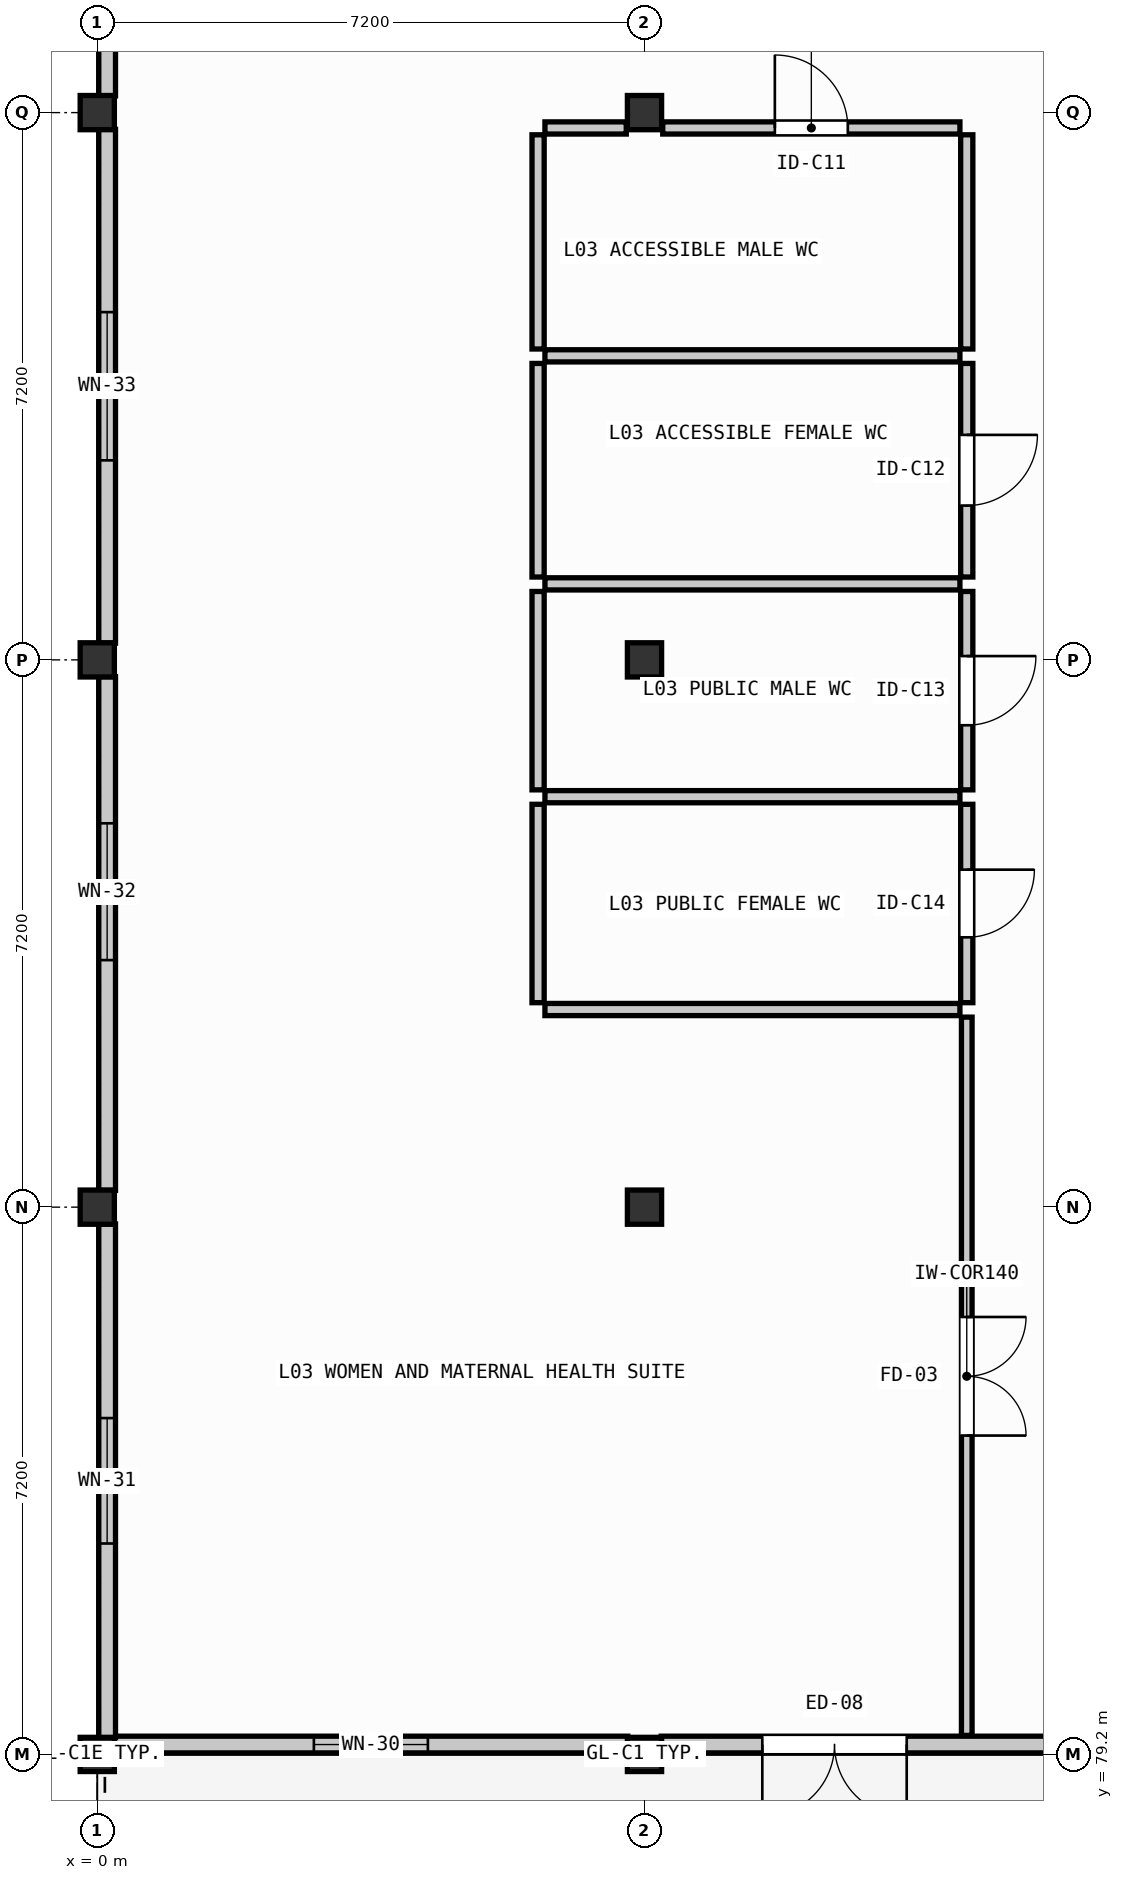
"""IFC4 building model, lengths in metres.
Left out: names, types, materials, properties, quantities, classifications, styles, units other than length and angle.
Written with IfcOpenShell. Run it as: python <this file> out.ifc"""

import sys

from ifc_helpers import new_model, si_unit, direction, frame, frame_2d, origin, origin_2d, place, context, subcontext, project, spatial, rectangle, extrude, element, fill, save


model = new_model("IFC4")
c1 = context("Model", 3, precision=1e-05, world=origin(), true_north=direction((0.0, 1.0)))
c2 = subcontext(c1, "Body", "Model", "MODEL_VIEW")
j1 = project(units=[si_unit("LENGTHUNIT", "METRE"), si_unit("PLANEANGLEUNIT", "RADIAN")], contexts=[c1])
p1 = place(None, origin())
s1 = spatial("IfcSite", under=j1, at=p1, CompositionType="ELEMENT")
p2 = place(p1, origin())
s2 = spatial("IfcBuilding", under=s1, at=p2, CompositionType="ELEMENT")
p3 = place(p2, frame((0.0, 0.0, 9.3)))
s3 = spatial("IfcBuildingStorey", under=s2, at=p3, CompositionType="ELEMENT", Elevation=9.3)
for number, where, z_axis, x_axis in (
    (1, (0.0, 79.2, 0.0), (0.0, 0.0, 1.0), (1.0, 0.0, 0.0)),
    (2, (0.0, 86.4, 0.0), (0.0, 0.0, 1.0), (1.0, 0.0, 0.0)),
    (3, (0.0, 93.6, 0.0), (0.0, 0.0, 1.0), (1.0, 0.0, 0.0)),
    (4, (0.0, 100.8, 0.0), (0.0, 0.0, 1.0), (1.0, 0.0, 0.0)),
    (5, (7.2, 79.2, 0.0), (0.0, 0.0, 1.0), (1.0, 0.0, 0.0)),
    (6, (7.2, 86.4, 0.0), (0.0, 0.0, 1.0), (1.0, 0.0, 0.0)),
    (7, (7.2, 93.6, 0.0), (0.0, 0.0, 1.0), (1.0, 0.0, 0.0)),
    (8, (7.2, 100.8, 0.0), (0.0, 0.0, 1.0), (1.0, 0.0, 0.0)),
):
    element("IfcColumn", number, at=place(p3, frame(where, z_axis=z_axis, x_axis=x_axis)), inside=s3, PredefinedType="COLUMN", context=c2, shape_type="SweptSolid", body=[
        extrude(rectangle(XDim=0.45, YDim=0.45, at=origin_2d()), origin(), (0.0, 0.0, 1.0), 3.99),
    ])
p4 = place(p3, frame((14.18, 79.33, 0.0), z_axis=(0.0, 0.0, 1.0), x_axis=(-1.0, 0.0, 0.0)))
e9 = element("IfcWall", 9, at=p4, inside=s3, PredefinedType="SOLIDWALL", context=c2, shape_type="SweptSolid", body=[
    extrude(rectangle(XDim=6.76, YDim=0.22, at=frame_2d((3.38, 0.0))), origin(), (0.0, 0.0, 1.0), 3.27),
])
p5 = place(p4, frame((3.53, 0.0, 0.0)))
e10 = element("IfcOpeningElement", 10, at=p5, cuts=e9, PredefinedType="OPENING", context=c2, shape_type="SweptSolid", body=[
    extrude(rectangle(XDim=1.9, YDim=2.3, at=frame_2d((0.95, 1.15))), frame((0.0, 0.12, 0.0), z_axis=(0.0, -1.0, 0.0), x_axis=(1.0, 0.0, 0.0)), (0.0, 0.0, 1.0), 0.24),
])
p6 = place(p3, frame((6.98, 79.33, 0.0), z_axis=(0.0, 0.0, 1.0), x_axis=(-1.0, 0.0, 0.0)))
e11 = element("IfcWall", 11, at=p6, inside=s3, PredefinedType="SOLIDWALL", context=c2, shape_type="SweptSolid", body=[
    extrude(rectangle(XDim=6.76, YDim=0.22, at=frame_2d((3.38, 0.0))), origin(), (0.0, 0.0, 1.0), 3.27),
])
p7 = place(p6, frame((2.63, 0.0, 0.95)))
e12 = element("IfcOpeningElement", 12, at=p7, cuts=e11, PredefinedType="OPENING", context=c2, shape_type="SweptSolid", body=[
    extrude(rectangle(XDim=1.5, YDim=1.25, at=frame_2d((0.75, 0.625))), frame((0.0, 0.12, 0.0), z_axis=(0.0, -1.0, 0.0), x_axis=(1.0, 0.0, 0.0)), (0.0, 0.0, 1.0), 0.24),
])
p8 = place(p3, frame((0.13, 79.42, 0.0), z_axis=(0.0, 0.0, 1.0), x_axis=(0.0, 1.0, 0.0)))
e13 = element("IfcWall", 13, at=p8, inside=s3, PredefinedType="SOLIDWALL", context=c2, shape_type="SweptSolid", body=[
    extrude(rectangle(XDim=6.76, YDim=0.22, at=frame_2d((3.38, 0.0))), origin(), (0.0, 0.0, 1.0), 3.27),
])
p9 = place(p8, frame((2.555, 0.0, 0.95)))
e14 = element("IfcOpeningElement", 14, at=p9, cuts=e13, PredefinedType="OPENING", context=c2, shape_type="SweptSolid", body=[
    extrude(rectangle(XDim=1.65, YDim=1.25, at=frame_2d((0.825, 0.625))), frame((0.0, 0.12, 0.0), z_axis=(0.0, -1.0, 0.0), x_axis=(1.0, 0.0, 0.0)), (0.0, 0.0, 1.0), 0.24),
])
p10 = place(p3, frame((0.13, 86.62, 0.0), z_axis=(0.0, 0.0, 1.0), x_axis=(0.0, 1.0, 0.0)))
e15 = element("IfcWall", 15, at=p10, inside=s3, PredefinedType="SOLIDWALL", context=c2, shape_type="SweptSolid", body=[
    extrude(rectangle(XDim=6.76, YDim=0.22, at=frame_2d((3.38, 0.0))), origin(), (0.0, 0.0, 1.0), 3.27),
])
p11 = place(p10, frame((3.03, 0.0, 0.95)))
e16 = element("IfcOpeningElement", 16, at=p11, cuts=e15, PredefinedType="OPENING", context=c2, shape_type="SweptSolid", body=[
    extrude(rectangle(XDim=1.8, YDim=1.25, at=frame_2d((0.9, 0.625))), frame((0.0, 0.12, 0.0), z_axis=(0.0, -1.0, 0.0), x_axis=(1.0, 0.0, 0.0)), (0.0, 0.0, 1.0), 0.24),
])
p12 = place(p3, frame((0.13, 93.82, 0.0), z_axis=(0.0, 0.0, 1.0), x_axis=(0.0, 1.0, 0.0)))
e17 = element("IfcWall", 17, at=p12, inside=s3, PredefinedType="SOLIDWALL", context=c2, shape_type="SweptSolid", body=[
    extrude(rectangle(XDim=6.76, YDim=0.22, at=frame_2d((3.38, 0.0))), origin(), (0.0, 0.0, 1.0), 3.27),
])
p13 = place(p12, frame((2.405, 0.0, 0.95)))
e18 = element("IfcOpeningElement", 18, at=p13, cuts=e17, PredefinedType="OPENING", context=c2, shape_type="SweptSolid", body=[
    extrude(rectangle(XDim=1.95, YDim=1.25, at=frame_2d((0.975, 0.625))), frame((0.0, 0.12, 0.0), z_axis=(0.0, -1.0, 0.0), x_axis=(1.0, 0.0, 0.0)), (0.0, 0.0, 1.0), 0.24),
])
p14 = place(p3, frame((0.13, 101.02, 0.0), z_axis=(0.0, 0.0, 1.0), x_axis=(0.0, 1.0, 0.0)))
e19 = element("IfcWall", 19, at=p14, inside=s3, PredefinedType="SOLIDWALL", context=c2, shape_type="SweptSolid", body=[
    extrude(rectangle(XDim=6.76, YDim=0.22, at=frame_2d((3.38, 0.0))), origin(), (0.0, 0.0, 1.0), 3.27),
])
p15 = place(p14, frame((2.33, 0.0, 0.95)))
e20 = element("IfcOpeningElement", 20, at=p15, cuts=e19, PredefinedType="OPENING", context=c2, shape_type="SweptSolid", body=[
    extrude(rectangle(XDim=2.1, YDim=1.25, at=frame_2d((1.05, 0.625))), frame((0.0, 0.12, 0.0), z_axis=(0.0, -1.0, 0.0), x_axis=(1.0, 0.0, 0.0)), (0.0, 0.0, 1.0), 0.24),
])
p16 = place(p3, frame((5.89, 100.598, 0.0), z_axis=(0.0, 0.0, 1.0), x_axis=(1.0, 0.0, 0.0)))
e21 = element("IfcWall", 21, at=p16, inside=s3, PredefinedType="PLUMBINGWALL", context=c2, shape_type="SweptSolid", body=[
    extrude(rectangle(XDim=1.07, YDim=0.16, at=frame_2d((0.535, 0.0))), origin(), (0.0, 0.0, 1.0), 3.27),
])
p17 = place(p3, frame((7.44, 100.598, 0.0), z_axis=(0.0, 0.0, 1.0), x_axis=(1.0, 0.0, 0.0)))
e22 = element("IfcWall", 22, at=p17, inside=s3, PredefinedType="PLUMBINGWALL", context=c2, shape_type="SweptSolid", body=[
    extrude(rectangle(XDim=3.91, YDim=0.16, at=frame_2d((1.955, 0.0))), origin(), (0.0, 0.0, 1.0), 3.27),
])
p18 = place(p17, frame((1.475, 0.0, 0.0)))
e23 = element("IfcOpeningElement", 23, at=p18, cuts=e22, PredefinedType="OPENING", context=c2, shape_type="SweptSolid", body=[
    extrude(rectangle(XDim=0.96, YDim=2.2, at=frame_2d((0.48, 1.1))), frame((0.0, 0.09, 0.0), z_axis=(0.0, -1.0, 0.0), x_axis=(1.0, 0.0, 0.0)), (0.0, 0.0, 1.0), 0.18),
])
p19 = place(p3, frame((11.44, 100.508, 0.0), z_axis=(0.0, 0.0, 1.0), x_axis=(0.0, -1.0, 0.0)))
e24 = element("IfcWall", 24, at=p19, inside=s3, PredefinedType="PLUMBINGWALL", context=c2, shape_type="SweptSolid", body=[
    extrude(rectangle(XDim=2.818, YDim=0.16, at=frame_2d((1.409, 0.0))), origin(), (0.0, 0.0, 1.0), 3.27),
])
p20 = place(p3, frame((11.35, 97.6, 0.0), z_axis=(0.0, 0.0, 1.0), x_axis=(-1.0, 0.0, 0.0)))
e25 = element("IfcWall", 25, at=p20, inside=s3, PredefinedType="PLUMBINGWALL", context=c2, shape_type="SweptSolid", body=[
    extrude(rectangle(XDim=5.46, YDim=0.16, at=frame_2d((2.73, 0.0))), origin(), (0.0, 0.0, 1.0), 3.35),
])
p21 = place(p3, frame((5.8, 97.69, 0.0), z_axis=(0.0, 0.0, 1.0), x_axis=(0.0, 1.0, 0.0)))
e26 = element("IfcWall", 26, at=p21, inside=s3, PredefinedType="PLUMBINGWALL", context=c2, shape_type="SweptSolid", body=[
    extrude(rectangle(XDim=2.818, YDim=0.16, at=frame_2d((1.409, 0.0))), origin(), (0.0, 0.0, 1.0), 3.27),
])
p22 = place(p3, frame((11.44, 97.5, 0.0), z_axis=(0.0, 0.0, 1.0), x_axis=(0.0, -1.0, 0.0)))
e27 = element("IfcWall", 27, at=p22, inside=s3, PredefinedType="PLUMBINGWALL", context=c2, shape_type="SweptSolid", body=[
    extrude(rectangle(XDim=2.81, YDim=0.16, at=frame_2d((1.405, 0.0))), origin(), (0.0, 0.0, 1.0), 3.97),
])
p23 = place(p22, frame((0.94, 0.0, 0.0)))
e28 = element("IfcOpeningElement", 28, at=p23, cuts=e27, PredefinedType="OPENING", context=c2, shape_type="SweptSolid", body=[
    extrude(rectangle(XDim=0.93, YDim=2.1, at=frame_2d((0.465, 1.05))), frame((0.0, 0.09, 0.0), z_axis=(0.0, -1.0, 0.0), x_axis=(1.0, 0.0, 0.0)), (0.0, 0.0, 1.0), 0.18),
])
p24 = place(p3, frame((11.35, 94.6, 0.0), z_axis=(0.0, 0.0, 1.0), x_axis=(-1.0, 0.0, 0.0)))
e29 = element("IfcWall", 29, at=p24, inside=s3, PredefinedType="PLUMBINGWALL", context=c2, shape_type="SweptSolid", body=[
    extrude(rectangle(XDim=5.46, YDim=0.16, at=frame_2d((2.73, 0.0))), origin(), (0.0, 0.0, 1.0), 3.35),
])
p25 = place(p3, frame((5.8, 94.69, 0.0), z_axis=(0.0, 0.0, 1.0), x_axis=(0.0, 1.0, 0.0)))
e30 = element("IfcWall", 30, at=p25, inside=s3, PredefinedType="PLUMBINGWALL", context=c2, shape_type="SweptSolid", body=[
    extrude(rectangle(XDim=2.81, YDim=0.16, at=frame_2d((1.405, 0.0))), origin(), (0.0, 0.0, 1.0), 3.97),
])
p26 = place(p3, frame((11.44, 94.5, 0.0), z_axis=(0.0, 0.0, 1.0), x_axis=(0.0, -1.0, 0.0)))
e31 = element("IfcWall", 31, at=p26, inside=s3, PredefinedType="PLUMBINGWALL", context=c2, shape_type="SweptSolid", body=[
    extrude(rectangle(XDim=2.61, YDim=0.16, at=frame_2d((1.305, 0.0))), origin(), (0.0, 0.0, 1.0), 3.27),
])
p27 = place(p26, frame((0.85, 0.0, 0.0)))
e32 = element("IfcOpeningElement", 32, at=p27, cuts=e31, PredefinedType="OPENING", context=c2, shape_type="SweptSolid", body=[
    extrude(rectangle(XDim=0.91, YDim=2.18, at=frame_2d((0.455, 1.09))), frame((0.0, 0.09, 0.0), z_axis=(0.0, -1.0, 0.0), x_axis=(1.0, 0.0, 0.0)), (0.0, 0.0, 1.0), 0.18),
])
p28 = place(p3, frame((11.35, 91.8, 0.0), z_axis=(0.0, 0.0, 1.0), x_axis=(-1.0, 0.0, 0.0)))
e33 = element("IfcWall", 33, at=p28, inside=s3, PredefinedType="PLUMBINGWALL", context=c2, shape_type="SweptSolid", body=[
    extrude(rectangle(XDim=5.46, YDim=0.16, at=frame_2d((2.73, 0.0))), origin(), (0.0, 0.0, 1.0), 3.35),
])
p29 = place(p3, frame((5.8, 91.89, 0.0), z_axis=(0.0, 0.0, 1.0), x_axis=(0.0, 1.0, 0.0)))
e34 = element("IfcWall", 34, at=p29, inside=s3, PredefinedType="PLUMBINGWALL", context=c2, shape_type="SweptSolid", body=[
    extrude(rectangle(XDim=2.61, YDim=0.16, at=frame_2d((1.305, 0.0))), origin(), (0.0, 0.0, 1.0), 3.27),
])
p30 = place(p3, frame((11.44, 91.7, 0.0), z_axis=(0.0, 0.0, 1.0), x_axis=(0.0, -1.0, 0.0)))
e35 = element("IfcWall", 35, at=p30, inside=s3, PredefinedType="PLUMBINGWALL", context=c2, shape_type="SweptSolid", body=[
    extrude(rectangle(XDim=2.61, YDim=0.16, at=frame_2d((1.305, 0.0))), origin(), (0.0, 0.0, 1.0), 3.97),
])
p31 = place(p30, frame((0.86, 0.0, 0.0)))
e36 = element("IfcOpeningElement", 36, at=p31, cuts=e35, PredefinedType="OPENING", context=c2, shape_type="SweptSolid", body=[
    extrude(rectangle(XDim=0.89, YDim=2.08, at=frame_2d((0.445, 1.04))), frame((0.0, 0.09, 0.0), z_axis=(0.0, -1.0, 0.0), x_axis=(1.0, 0.0, 0.0)), (0.0, 0.0, 1.0), 0.18),
])
p32 = place(p3, frame((11.35, 89.0, 0.0), z_axis=(0.0, 0.0, 1.0), x_axis=(-1.0, 0.0, 0.0)))
e37 = element("IfcWall", 37, at=p32, inside=s3, PredefinedType="PLUMBINGWALL", context=c2, shape_type="SweptSolid", body=[
    extrude(rectangle(XDim=5.46, YDim=0.16, at=frame_2d((2.73, 0.0))), origin(), (0.0, 0.0, 1.0), 3.35),
])
p33 = place(p3, frame((5.8, 89.09, 0.0), z_axis=(0.0, 0.0, 1.0), x_axis=(0.0, 1.0, 0.0)))
e38 = element("IfcWall", 38, at=p33, inside=s3, PredefinedType="PLUMBINGWALL", context=c2, shape_type="SweptSolid", body=[
    extrude(rectangle(XDim=2.61, YDim=0.16, at=frame_2d((1.305, 0.0))), origin(), (0.0, 0.0, 1.0), 3.97),
])
p34 = place(p3, frame((11.44, 88.9, 0.0), z_axis=(0.0, 0.0, 1.0), x_axis=(0.0, -1.0, 0.0)))
e39 = element("IfcWall", 39, at=p34, inside=s3, PredefinedType="PARTITIONING", context=c2, shape_type="SweptSolid", body=[
    extrude(rectangle(XDim=9.45, YDim=0.14, at=frame_2d((4.725, 0.0))), origin(), (0.0, 0.0, 1.0), 3.27),
])
p35 = place(p34, frame((3.945, 0.0, 0.0)))
e40 = element("IfcOpeningElement", 40, at=p35, cuts=e39, PredefinedType="OPENING", context=c2, shape_type="SweptSolid", body=[
    extrude(rectangle(XDim=1.56, YDim=2.22, at=frame_2d((0.78, 1.11))), frame((0.0, 0.08, 0.0), z_axis=(0.0, -1.0, 0.0), x_axis=(1.0, 0.0, 0.0)), (0.0, 0.0, 1.0), 0.16),
])
p36 = place(p5, origin())
e41 = element("IfcDoor", 41, at=p36, inside=s3, OperationType="DOUBLE_DOOR_SINGLE_SWING", PredefinedType="DOOR", context=c2, shape_type="SweptSolid", body=[
    extrude(rectangle(XDim=1.9, YDim=2.3, at=frame_2d((0.95, 1.15))), frame((0.0, 0.025, 0.0), z_axis=(0.0, -1.0, 0.0), x_axis=(1.0, 0.0, 0.0)), (0.0, 0.0, 1.0), 0.05),
])
fill(e10, e41)
p37 = place(p7, origin())
e42 = element("IfcWindow", 42, at=p37, inside=s3, PartitioningType="SINGLE_PANEL", PredefinedType="WINDOW", context=c2, shape_type="SweptSolid", body=[
    extrude(rectangle(XDim=1.5, YDim=1.25, at=frame_2d((0.75, 0.625))), frame((0.0, 0.03, 0.0), z_axis=(0.0, -1.0, 0.0), x_axis=(1.0, 0.0, 0.0)), (0.0, 0.0, 1.0), 0.06),
])
fill(e12, e42)
p38 = place(p9, origin())
e43 = element("IfcWindow", 43, at=p38, inside=s3, PartitioningType="SINGLE_PANEL", PredefinedType="WINDOW", context=c2, shape_type="SweptSolid", body=[
    extrude(rectangle(XDim=1.65, YDim=1.25, at=frame_2d((0.825, 0.625))), frame((0.0, 0.03, 0.0), z_axis=(0.0, -1.0, 0.0), x_axis=(1.0, 0.0, 0.0)), (0.0, 0.0, 1.0), 0.06),
])
fill(e14, e43)
p39 = place(p11, origin())
e44 = element("IfcWindow", 44, at=p39, inside=s3, PartitioningType="SINGLE_PANEL", PredefinedType="WINDOW", context=c2, shape_type="SweptSolid", body=[
    extrude(rectangle(XDim=1.8, YDim=1.25, at=frame_2d((0.9, 0.625))), frame((0.0, 0.03, 0.0), z_axis=(0.0, -1.0, 0.0), x_axis=(1.0, 0.0, 0.0)), (0.0, 0.0, 1.0), 0.06),
])
fill(e16, e44)
p40 = place(p13, origin())
e45 = element("IfcWindow", 45, at=p40, inside=s3, PartitioningType="SINGLE_PANEL", PredefinedType="WINDOW", context=c2, shape_type="SweptSolid", body=[
    extrude(rectangle(XDim=1.95, YDim=1.25, at=frame_2d((0.975, 0.625))), frame((0.0, 0.03, 0.0), z_axis=(0.0, -1.0, 0.0), x_axis=(1.0, 0.0, 0.0)), (0.0, 0.0, 1.0), 0.06),
])
fill(e18, e45)
p41 = place(p18, origin())
e46 = element("IfcDoor", 46, at=p41, inside=s3, OperationType="SINGLE_SWING_RIGHT", PredefinedType="DOOR", context=c2, shape_type="SweptSolid", body=[
    extrude(rectangle(XDim=0.96, YDim=2.2, at=frame_2d((0.48, 1.1))), frame((0.0, 0.025, 0.0), z_axis=(0.0, -1.0, 0.0), x_axis=(1.0, 0.0, 0.0)), (0.0, 0.0, 1.0), 0.05),
])
fill(e23, e46)
p42 = place(p23, origin())
e47 = element("IfcDoor", 47, at=p42, inside=s3, OperationType="SINGLE_SWING_LEFT", PredefinedType="DOOR", context=c2, shape_type="SweptSolid", body=[
    extrude(rectangle(XDim=0.93, YDim=2.1, at=frame_2d((0.465, 1.05))), frame((0.0, 0.025, 0.0), z_axis=(0.0, -1.0, 0.0), x_axis=(1.0, 0.0, 0.0)), (0.0, 0.0, 1.0), 0.05),
])
fill(e28, e47)
p43 = place(p27, origin())
e48 = element("IfcDoor", 48, at=p43, inside=s3, OperationType="SINGLE_SWING_RIGHT", PredefinedType="DOOR", context=c2, shape_type="SweptSolid", body=[
    extrude(rectangle(XDim=0.91, YDim=2.18, at=frame_2d((0.455, 1.09))), frame((0.0, 0.025, 0.0), z_axis=(0.0, -1.0, 0.0), x_axis=(1.0, 0.0, 0.0)), (0.0, 0.0, 1.0), 0.05),
])
fill(e32, e48)
p44 = place(p31, origin())
e49 = element("IfcDoor", 49, at=p44, inside=s3, OperationType="SINGLE_SWING_LEFT", PredefinedType="DOOR", context=c2, shape_type="SweptSolid", body=[
    extrude(rectangle(XDim=0.89, YDim=2.08, at=frame_2d((0.445, 1.04))), frame((0.0, 0.025, 0.0), z_axis=(0.0, -1.0, 0.0), x_axis=(1.0, 0.0, 0.0)), (0.0, 0.0, 1.0), 0.05),
])
fill(e36, e49)
p45 = place(p35, origin())
e50 = element("IfcDoor", 50, at=p45, inside=s3, OperationType="DOUBLE_DOOR_SINGLE_SWING", PredefinedType="DOOR", context=c2, shape_type="SweptSolid", body=[
    extrude(rectangle(XDim=1.56, YDim=2.22, at=frame_2d((0.78, 1.11))), frame((0.0, 0.025, 0.0), z_axis=(0.0, -1.0, 0.0), x_axis=(1.0, 0.0, 0.0)), (0.0, 0.0, 1.0), 0.05),
])
fill(e40, e50)
save(model, sys.argv[1])
